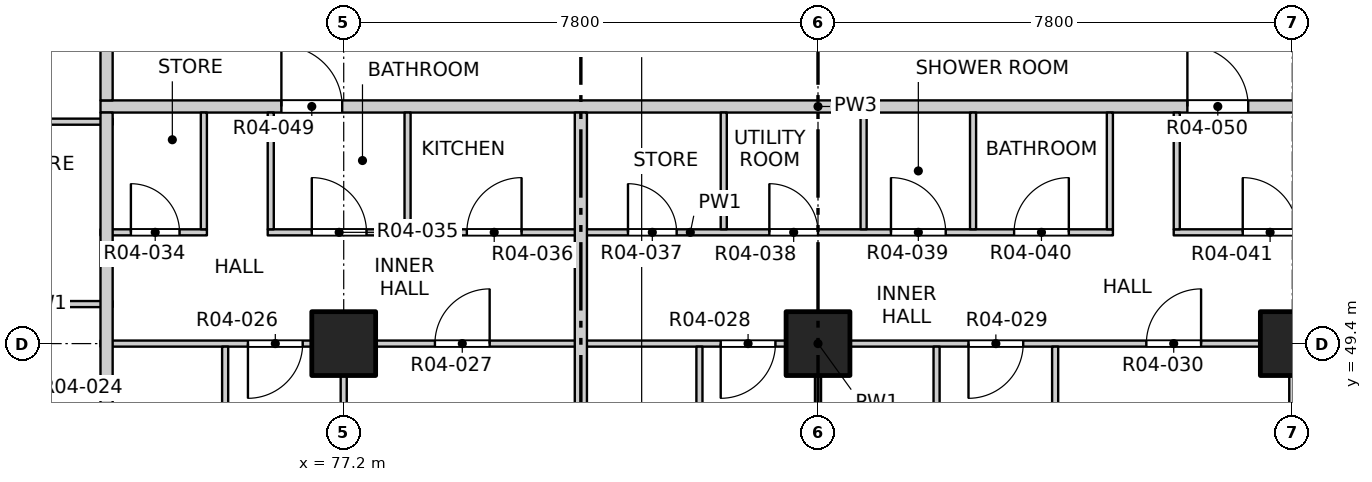
"""IFC4 building model, lengths in metres.
Left out: names, types, materials, properties, quantities, classifications, styles, units other than length and angle.
Written with IfcOpenShell. Run it as: python <this file> out.ifc"""

import sys

from ifc_helpers import new_model, si_unit, direction, frame, frame_2d, origin, origin_2d, place, context, subcontext, project, spatial, rectangle, extrude, element, fill, save


model = new_model("IFC4")
c1 = context("Model", 3, precision=1e-05, world=origin(), true_north=direction((0.0, 1.0)))
c2 = subcontext(c1, "Body", "Model", "MODEL_VIEW")
j1 = project(units=[si_unit("LENGTHUNIT", "METRE"), si_unit("PLANEANGLEUNIT", "RADIAN")], contexts=[c1])
p1 = place(None, origin())
s1 = spatial("IfcSite", under=j1, at=p1, CompositionType="ELEMENT")
p2 = place(p1, origin())
s2 = spatial("IfcBuilding", under=s1, at=p2, CompositionType="ELEMENT")
p3 = place(p2, frame((0.0, 0.0, 58.0)))
s3 = spatial("IfcBuildingStorey", under=s2, at=p3, CompositionType="ELEMENT", Elevation=58.0)
for number, where, z_axis, x_axis in (
    (1, (77.2, 49.4, -0.25), (0.0, 0.0, 1.0), (1.0, 0.0, 0.0)),
    (2, (85.0, 49.4, -0.25), (0.0, 0.0, 1.0), (1.0, 0.0, 0.0)),
    (3, (92.8, 49.4, -0.25), (0.0, 0.0, 1.0), (1.0, 0.0, 0.0)),
):
    element("IfcColumn", number, at=place(p3, frame(where, z_axis=z_axis, x_axis=x_axis)), inside=s3, PredefinedType="COLUMN", context=c2, shape_type="SweptSolid", body=[
        extrude(rectangle(XDim=1.05, YDim=1.05, at=origin_2d()), origin(), (0.0, 0.0, 1.0), 3.4),
    ])
p4 = place(p3, frame((73.2, 49.4, 0.0), z_axis=(0.0, 0.0, 1.0), x_axis=(1.0, 0.0, 0.0)))
e4 = element("IfcWall", 4, at=p4, inside=s3, PredefinedType="PARTITIONING", context=c2, shape_type="SweptSolid", body=[
    extrude(rectangle(XDim=23.6, YDim=0.1, at=frame_2d((11.8, 0.0))), origin(), (0.0, 0.0, 1.0), 3.15),
])
p5 = place(p4, frame((2.425, 0.0, 0.0)))
e5 = element("IfcOpeningElement", 5, at=p5, cuts=e4, PredefinedType="OPENING", context=c2, shape_type="SweptSolid", body=[
    extrude(rectangle(XDim=0.9, YDim=2.1, at=frame_2d((0.45, 1.05))), frame((0.0, 0.06, 0.0), z_axis=(0.0, -1.0, 0.0), x_axis=(1.0, 0.0, 0.0)), (0.0, 0.0, 1.0), 0.12),
])
p6 = place(p4, frame((5.5, 0.0, 0.0)))
e6 = element("IfcOpeningElement", 6, at=p6, cuts=e4, PredefinedType="OPENING", context=c2, shape_type="SweptSolid", body=[
    extrude(rectangle(XDim=0.9, YDim=2.1, at=frame_2d((0.45, 1.05))), frame((0.0, 0.06, 0.0), z_axis=(0.0, -1.0, 0.0), x_axis=(1.0, 0.0, 0.0)), (0.0, 0.0, 1.0), 0.12),
])
p7 = place(p4, frame((10.2, 0.0, 0.0)))
e7 = element("IfcOpeningElement", 7, at=p7, cuts=e4, PredefinedType="OPENING", context=c2, shape_type="SweptSolid", body=[
    extrude(rectangle(XDim=0.9, YDim=2.1, at=frame_2d((0.45, 1.05))), frame((0.0, 0.06, 0.0), z_axis=(0.0, -1.0, 0.0), x_axis=(1.0, 0.0, 0.0)), (0.0, 0.0, 1.0), 0.12),
])
p8 = place(p4, frame((14.275, 0.0, 0.0)))
e8 = element("IfcOpeningElement", 8, at=p8, cuts=e4, PredefinedType="OPENING", context=c2, shape_type="SweptSolid", body=[
    extrude(rectangle(XDim=0.9, YDim=2.1, at=frame_2d((0.45, 1.05))), frame((0.0, 0.06, 0.0), z_axis=(0.0, -1.0, 0.0), x_axis=(1.0, 0.0, 0.0)), (0.0, 0.0, 1.0), 0.12),
])
p9 = place(p4, frame((17.2, 0.0, 0.0)))
e9 = element("IfcOpeningElement", 9, at=p9, cuts=e4, PredefinedType="OPENING", context=c2, shape_type="SweptSolid", body=[
    extrude(rectangle(XDim=0.9, YDim=2.1, at=frame_2d((0.45, 1.05))), frame((0.0, 0.06, 0.0), z_axis=(0.0, -1.0, 0.0), x_axis=(1.0, 0.0, 0.0)), (0.0, 0.0, 1.0), 0.12),
])
p10 = place(p4, frame((21.1, 0.0, 0.0)))
e10 = element("IfcOpeningElement", 10, at=p10, cuts=e4, PredefinedType="OPENING", context=c2, shape_type="SweptSolid", body=[
    extrude(rectangle(XDim=0.9, YDim=2.1, at=frame_2d((0.45, 1.05))), frame((0.0, 0.06, 0.0), z_axis=(0.0, -1.0, 0.0), x_axis=(1.0, 0.0, 0.0)), (0.0, 0.0, 1.0), 0.12),
])
p11 = place(p3, frame((71.18, 50.05, 0.0), z_axis=(0.0, 0.0, 1.0), x_axis=(1.0, 0.0, 0.0)))
e11 = element("IfcWall", 11, at=p11, inside=s3, PredefinedType="PARTITIONING", context=c2, shape_type="SweptSolid", body=[
    extrude(rectangle(XDim=2.22, YDim=0.1, at=frame_2d((1.11, 0.0))), origin(), (0.0, 0.0, 1.0), 3.15),
])
p12 = place(p3, frame((73.2, 51.23, 0.0), z_axis=(0.0, 0.0, 1.0), x_axis=(1.0, 0.0, 0.0)))
e12 = element("IfcWall", 12, at=p12, inside=s3, PredefinedType="PARTITIONING", context=c2, shape_type="SweptSolid", body=[
    extrude(rectangle(XDim=1.75, YDim=0.1, at=frame_2d((0.875, 0.0))), origin(), (0.0, 0.0, 1.0), 3.15),
])
p13 = place(p12, frame((0.5, 0.0, 0.0)))
e13 = element("IfcOpeningElement", 13, at=p13, cuts=e12, PredefinedType="OPENING", context=c2, shape_type="SweptSolid", body=[
    extrude(rectangle(XDim=0.8, YDim=2.1, at=frame_2d((0.4, 1.05))), frame((0.0, 0.06, 0.0), z_axis=(0.0, -1.0, 0.0), x_axis=(1.0, 0.0, 0.0)), (0.0, 0.0, 1.0), 0.12),
])
p14 = place(p3, frame((75.95, 51.23, 0.0), z_axis=(0.0, 0.0, 1.0), x_axis=(1.0, 0.0, 0.0)))
e14 = element("IfcWall", 14, at=p14, inside=s3, PredefinedType="PARTITIONING", context=c2, shape_type="SweptSolid", body=[
    extrude(rectangle(XDim=13.9, YDim=0.1, at=frame_2d((6.95, 0.0))), origin(), (0.0, 0.0, 1.0), 3.15),
])
p15 = place(p14, frame((0.725, 0.0, 0.0)))
e15 = element("IfcOpeningElement", 15, at=p15, cuts=e14, PredefinedType="OPENING", context=c2, shape_type="SweptSolid", body=[
    extrude(rectangle(XDim=0.9, YDim=2.1, at=frame_2d((0.45, 1.05))), frame((0.0, 0.06, 0.0), z_axis=(0.0, -1.0, 0.0), x_axis=(1.0, 0.0, 0.0)), (0.0, 0.0, 1.0), 0.12),
])
p16 = place(p14, frame((3.275, 0.0, 0.0)))
e16 = element("IfcOpeningElement", 16, at=p16, cuts=e14, PredefinedType="OPENING", context=c2, shape_type="SweptSolid", body=[
    extrude(rectangle(XDim=0.9, YDim=2.1, at=frame_2d((0.45, 1.05))), frame((0.0, 0.06, 0.0), z_axis=(0.0, -1.0, 0.0), x_axis=(1.0, 0.0, 0.0)), (0.0, 0.0, 1.0), 0.12),
])
p17 = place(p14, frame((5.925, 0.0, 0.0)))
e17 = element("IfcOpeningElement", 17, at=p17, cuts=e14, PredefinedType="OPENING", context=c2, shape_type="SweptSolid", body=[
    extrude(rectangle(XDim=0.8, YDim=2.1, at=frame_2d((0.4, 1.05))), frame((0.0, 0.06, 0.0), z_axis=(0.0, -1.0, 0.0), x_axis=(1.0, 0.0, 0.0)), (0.0, 0.0, 1.0), 0.12),
])
p18 = place(p14, frame((8.25, 0.0, 0.0)))
e18 = element("IfcOpeningElement", 18, at=p18, cuts=e14, PredefinedType="OPENING", context=c2, shape_type="SweptSolid", body=[
    extrude(rectangle(XDim=0.8, YDim=2.1, at=frame_2d((0.4, 1.05))), frame((0.0, 0.06, 0.0), z_axis=(0.0, -1.0, 0.0), x_axis=(1.0, 0.0, 0.0)), (0.0, 0.0, 1.0), 0.12),
])
p19 = place(p14, frame((10.25, 0.0, 0.0)))
e19 = element("IfcOpeningElement", 19, at=p19, cuts=e14, PredefinedType="OPENING", context=c2, shape_type="SweptSolid", body=[
    extrude(rectangle(XDim=0.9, YDim=2.1, at=frame_2d((0.45, 1.05))), frame((0.0, 0.06, 0.0), z_axis=(0.0, -1.0, 0.0), x_axis=(1.0, 0.0, 0.0)), (0.0, 0.0, 1.0), 0.12),
])
p20 = place(p14, frame((12.275, 0.0, 0.0)))
e20 = element("IfcOpeningElement", 20, at=p20, cuts=e14, PredefinedType="OPENING", context=c2, shape_type="SweptSolid", body=[
    extrude(rectangle(XDim=0.9, YDim=2.1, at=frame_2d((0.45, 1.05))), frame((0.0, 0.06, 0.0), z_axis=(0.0, -1.0, 0.0), x_axis=(1.0, 0.0, 0.0)), (0.0, 0.0, 1.0), 0.12),
])
p21 = place(p3, frame((90.85, 51.23, 0.0), z_axis=(0.0, 0.0, 1.0), x_axis=(1.0, 0.0, 0.0)))
e21 = element("IfcWall", 21, at=p21, inside=s3, PredefinedType="PARTITIONING", context=c2, shape_type="SweptSolid", body=[
    extrude(rectangle(XDim=5.95, YDim=0.1, at=frame_2d((2.975, 0.0))), origin(), (0.0, 0.0, 1.0), 3.15),
])
p22 = place(p21, frame((1.135, 0.0, 0.0)))
e22 = element("IfcOpeningElement", 22, at=p22, cuts=e21, PredefinedType="OPENING", context=c2, shape_type="SweptSolid", body=[
    extrude(rectangle(XDim=0.9, YDim=2.1, at=frame_2d((0.45, 1.05))), frame((0.0, 0.06, 0.0), z_axis=(0.0, -1.0, 0.0), x_axis=(1.0, 0.0, 0.0)), (0.0, 0.0, 1.0), 0.12),
])
p23 = place(p21, frame((4.085, 0.0, 0.0)))
e23 = element("IfcOpeningElement", 23, at=p23, cuts=e21, PredefinedType="OPENING", context=c2, shape_type="SweptSolid", body=[
    extrude(rectangle(XDim=0.8, YDim=2.1, at=frame_2d((0.4, 1.05))), frame((0.0, 0.06, 0.0), z_axis=(0.0, -1.0, 0.0), x_axis=(1.0, 0.0, 0.0)), (0.0, 0.0, 1.0), 0.12),
])
p24 = place(p3, frame((71.18, 53.05, 0.0), z_axis=(0.0, 0.0, 1.0), x_axis=(1.0, 0.0, 0.0)))
e24 = element("IfcWall", 24, at=p24, inside=s3, PredefinedType="PARTITIONING", context=c2, shape_type="SweptSolid", body=[
    extrude(rectangle(XDim=2.22, YDim=0.1, at=frame_2d((1.11, 0.0))), origin(), (0.0, 0.0, 1.0), 3.15),
])
p25 = place(p3, frame((73.2, 53.3, 0.0), z_axis=(0.0, 0.0, 1.0), x_axis=(1.0, 0.0, 0.0)))
e25 = element("IfcWall", 25, at=p25, inside=s3, PredefinedType="PARTITIONING", context=c2, shape_type="SweptSolid", body=[
    extrude(rectangle(XDim=23.6, YDim=0.2, at=frame_2d((11.8, 0.0))), origin(), (0.0, 0.0, 1.0), 3.15),
])
p26 = place(p25, frame((2.975, 0.0, 0.0)))
e26 = element("IfcOpeningElement", 26, at=p26, cuts=e25, PredefinedType="OPENING", context=c2, shape_type="SweptSolid", body=[
    extrude(rectangle(XDim=1.0, YDim=2.1, at=frame_2d((0.5, 1.05))), frame((0.0, 0.11, 0.0), z_axis=(0.0, -1.0, 0.0), x_axis=(1.0, 0.0, 0.0)), (0.0, 0.0, 1.0), 0.22),
])
p27 = place(p25, frame((17.875, 0.0, 0.0)))
e27 = element("IfcOpeningElement", 27, at=p27, cuts=e25, PredefinedType="OPENING", context=c2, shape_type="SweptSolid", body=[
    extrude(rectangle(XDim=1.0, YDim=2.1, at=frame_2d((0.5, 1.05))), frame((0.0, 0.11, 0.0), z_axis=(0.0, -1.0, 0.0), x_axis=(1.0, 0.0, 0.0)), (0.0, 0.0, 1.0), 0.22),
])
p28 = place(p3, frame((73.3, 41.9, 0.0), z_axis=(0.0, 0.0, 1.0), x_axis=(0.0, 1.0, 0.0)))
e28 = element("IfcWall", 28, at=p28, inside=s3, PredefinedType="PARTITIONING", context=c2, shape_type="SweptSolid", body=[
    extrude(rectangle(XDim=11.3, YDim=0.2, at=frame_2d((5.65, 0.0))), origin(), (0.0, 0.0, 1.0), 3.15),
])
p29 = place(p3, frame((73.3, 53.4, 0.0), z_axis=(0.0, 0.0, 1.0), x_axis=(0.0, 1.0, 0.0)))
e29 = element("IfcWall", 29, at=p29, inside=s3, PredefinedType="PARTITIONING", context=c2, shape_type="SweptSolid", body=[
    extrude(rectangle(XDim=31.0, YDim=0.2, at=frame_2d((15.5, 0.0))), origin(), (0.0, 0.0, 1.0), 3.15),
])
p30 = place(p29, frame((3.325, 0.0, 0.0)))
e30 = element("IfcOpeningElement", 30, at=p30, cuts=e29, PredefinedType="OPENING", context=c2, shape_type="SweptSolid", body=[
    extrude(rectangle(XDim=1.0, YDim=2.1, at=frame_2d((0.5, 1.05))), frame((0.0, 0.11, 0.0), z_axis=(0.0, -1.0, 0.0), x_axis=(1.0, 0.0, 0.0)), (0.0, 0.0, 1.0), 0.22),
])
p31 = place(p29, frame((21.675, 0.0, 0.0)))
e31 = element("IfcOpeningElement", 31, at=p31, cuts=e29, PredefinedType="OPENING", context=c2, shape_type="SweptSolid", body=[
    extrude(rectangle(XDim=1.0, YDim=2.1, at=frame_2d((0.5, 1.05))), frame((0.0, 0.11, 0.0), z_axis=(0.0, -1.0, 0.0), x_axis=(1.0, 0.0, 0.0)), (0.0, 0.0, 1.0), 0.22),
])
p32 = place(p29, frame((26.225, 0.0, 0.0)))
e32 = element("IfcOpeningElement", 32, at=p32, cuts=e29, PredefinedType="OPENING", context=c2, shape_type="SweptSolid", body=[
    extrude(rectangle(XDim=1.0, YDim=2.1, at=frame_2d((0.5, 1.05))), frame((0.0, 0.11, 0.0), z_axis=(0.0, -1.0, 0.0), x_axis=(1.0, 0.0, 0.0)), (0.0, 0.0, 1.0), 0.22),
])
p33 = place(p3, frame((74.9, 51.28, 0.0), z_axis=(0.0, 0.0, 1.0), x_axis=(0.0, 1.0, 0.0)))
e33 = element("IfcWall", 33, at=p33, inside=s3, PredefinedType="PARTITIONING", context=c2, shape_type="SweptSolid", body=[
    extrude(rectangle(XDim=1.92, YDim=0.1, at=frame_2d((0.96, 0.0))), origin(), (0.0, 0.0, 1.0), 3.15),
])
p34 = place(p3, frame((75.25, 45.85, 0.0), z_axis=(0.0, 0.0, 1.0), x_axis=(0.0, 1.0, 0.0)))
e34 = element("IfcWall", 34, at=p34, inside=s3, PredefinedType="PARTITIONING", context=c2, shape_type="SweptSolid", body=[
    extrude(rectangle(XDim=3.5, YDim=0.1, at=frame_2d((1.75, 0.0))), origin(), (0.0, 0.0, 1.0), 3.15),
])
p35 = place(p3, frame((76.0, 51.28, 0.0), z_axis=(0.0, 0.0, 1.0), x_axis=(0.0, 1.0, 0.0)))
e35 = element("IfcWall", 35, at=p35, inside=s3, PredefinedType="PARTITIONING", context=c2, shape_type="SweptSolid", body=[
    extrude(rectangle(XDim=1.92, YDim=0.1, at=frame_2d((0.96, 0.0))), origin(), (0.0, 0.0, 1.0), 3.15),
])
p36 = place(p3, frame((77.2, 41.9, 0.0), z_axis=(0.0, 0.0, 1.0), x_axis=(0.0, 1.0, 0.0)))
e36 = element("IfcWall", 36, at=p36, inside=s3, PredefinedType="PARTITIONING", context=c2, shape_type="SweptSolid", body=[
    extrude(rectangle(XDim=7.45, YDim=0.1, at=frame_2d((3.725, 0.0))), origin(), (0.0, 0.0, 1.0), 2.55),
])
p37 = place(p3, frame((78.25, 51.28, 0.0), z_axis=(0.0, 0.0, 1.0), x_axis=(0.0, 1.0, 0.0)))
e37 = element("IfcWall", 37, at=p37, inside=s3, PredefinedType="PARTITIONING", context=c2, shape_type="SweptSolid", body=[
    extrude(rectangle(XDim=1.92, YDim=0.1, at=frame_2d((0.96, 0.0))), origin(), (0.0, 0.0, 1.0), 3.15),
])
p38 = place(p3, frame((81.1, 41.9, 0.0), z_axis=(0.0, 0.0, 1.0), x_axis=(0.0, 1.0, 0.0)))
e38 = element("IfcWall", 38, at=p38, inside=s3, PredefinedType="PARTITIONING", context=c2, shape_type="SweptSolid", body=[
    extrude(rectangle(XDim=11.3, YDim=0.2, at=frame_2d((5.65, 0.0))), origin(), (0.0, 0.0, 1.0), 3.15),
])
p39 = place(p3, frame((83.05, 46.15, 0.0), z_axis=(0.0, 0.0, 1.0), x_axis=(0.0, 1.0, 0.0)))
e39 = element("IfcWall", 39, at=p39, inside=s3, PredefinedType="PARTITIONING", context=c2, shape_type="SweptSolid", body=[
    extrude(rectangle(XDim=3.2, YDim=0.1, at=frame_2d((1.6, 0.0))), origin(), (0.0, 0.0, 1.0), 3.15),
])
p40 = place(p3, frame((83.45, 51.28, 0.0), z_axis=(0.0, 0.0, 1.0), x_axis=(0.0, 1.0, 0.0)))
e40 = element("IfcWall", 40, at=p40, inside=s3, PredefinedType="PARTITIONING", context=c2, shape_type="SweptSolid", body=[
    extrude(rectangle(XDim=1.92, YDim=0.1, at=frame_2d((0.96, 0.0))), origin(), (0.0, 0.0, 1.0), 3.15),
])
p41 = place(p3, frame((85.0, 41.9, 0.0), z_axis=(0.0, 0.0, 1.0), x_axis=(0.0, 1.0, 0.0)))
e41 = element("IfcWall", 41, at=p41, inside=s3, PredefinedType="PARTITIONING", context=c2, shape_type="SweptSolid", body=[
    extrude(rectangle(XDim=7.45, YDim=0.1, at=frame_2d((3.725, 0.0))), origin(), (0.0, 0.0, 1.0), 2.55),
])
p42 = place(p3, frame((85.75, 51.28, 0.0), z_axis=(0.0, 0.0, 1.0), x_axis=(0.0, 1.0, 0.0)))
e42 = element("IfcWall", 42, at=p42, inside=s3, PredefinedType="PARTITIONING", context=c2, shape_type="SweptSolid", body=[
    extrude(rectangle(XDim=1.92, YDim=0.1, at=frame_2d((0.96, 0.0))), origin(), (0.0, 0.0, 1.0), 3.15),
])
p43 = place(p3, frame((86.95, 46.15, 0.0), z_axis=(0.0, 0.0, 1.0), x_axis=(0.0, 1.0, 0.0)))
e43 = element("IfcWall", 43, at=p43, inside=s3, PredefinedType="PARTITIONING", context=c2, shape_type="SweptSolid", body=[
    extrude(rectangle(XDim=3.2, YDim=0.1, at=frame_2d((1.6, 0.0))), origin(), (0.0, 0.0, 1.0), 3.15),
])
p44 = place(p3, frame((87.55, 51.28, 0.0), z_axis=(0.0, 0.0, 1.0), x_axis=(0.0, 1.0, 0.0)))
e44 = element("IfcWall", 44, at=p44, inside=s3, PredefinedType="PARTITIONING", context=c2, shape_type="SweptSolid", body=[
    extrude(rectangle(XDim=1.92, YDim=0.1, at=frame_2d((0.96, 0.0))), origin(), (0.0, 0.0, 1.0), 3.15),
])
p45 = place(p3, frame((88.9, 41.9, 0.0), z_axis=(0.0, 0.0, 1.0), x_axis=(0.0, 1.0, 0.0)))
e45 = element("IfcWall", 45, at=p45, inside=s3, PredefinedType="PARTITIONING", context=c2, shape_type="SweptSolid", body=[
    extrude(rectangle(XDim=7.45, YDim=0.1, at=frame_2d((3.725, 0.0))), origin(), (0.0, 0.0, 1.0), 3.15),
])
for number, where, z_axis, x_axis in (
    (46, (89.8, 51.28, 0.0), (0.0, 0.0, 1.0), (0.0, 1.0, 0.0)),
    (47, (90.9, 51.28, 0.0), (0.0, 0.0, 1.0), (0.0, 1.0, 0.0)),
):
    element("IfcWall", number, at=place(p3, frame(where, z_axis=z_axis, x_axis=x_axis)), inside=s3, PredefinedType="PARTITIONING", context=c2, shape_type="SweptSolid", body=[
        extrude(rectangle(XDim=1.92, YDim=0.1, at=frame_2d((0.96, 0.0))), origin(), (0.0, 0.0, 1.0), 3.15),
    ])
p46 = place(p3, frame((92.8, 41.9, 0.0), z_axis=(0.0, 0.0, 1.0), x_axis=(0.0, 1.0, 0.0)))
e48 = element("IfcWall", 48, at=p46, inside=s3, PredefinedType="PARTITIONING", context=c2, shape_type="SweptSolid", body=[
    extrude(rectangle(XDim=7.45, YDim=0.1, at=frame_2d((3.725, 0.0))), origin(), (0.0, 0.0, 1.0), 2.55),
])
p47 = place(p5, origin())
e49 = element("IfcDoor", 49, at=p47, inside=s3, OperationType="SINGLE_SWING_RIGHT", PredefinedType="DOOR", context=c2, shape_type="SweptSolid", body=[
    extrude(rectangle(XDim=0.9, YDim=2.1, at=frame_2d((0.45, 1.05))), frame((0.0, 0.025, 0.0), z_axis=(0.0, -1.0, 0.0), x_axis=(1.0, 0.0, 0.0)), (0.0, 0.0, 1.0), 0.05),
])
fill(e5, e49)
p48 = place(p6, origin())
e50 = element("IfcDoor", 50, at=p48, inside=s3, OperationType="SINGLE_SWING_RIGHT", PredefinedType="DOOR", context=c2, shape_type="SweptSolid", body=[
    extrude(rectangle(XDim=0.9, YDim=2.1, at=frame_2d((0.45, 1.05))), frame((0.0, 0.025, 0.0), z_axis=(0.0, -1.0, 0.0), x_axis=(1.0, 0.0, 0.0)), (0.0, 0.0, 1.0), 0.05),
])
fill(e6, e50)
p49 = place(p7, origin())
e51 = element("IfcDoor", 51, at=p49, inside=s3, OperationType="SINGLE_SWING_RIGHT", PredefinedType="DOOR", context=c2, shape_type="SweptSolid", body=[
    extrude(rectangle(XDim=0.9, YDim=2.1, at=frame_2d((0.45, 1.05))), frame((0.0, 0.025, 0.0), z_axis=(0.0, -1.0, 0.0), x_axis=(1.0, 0.0, 0.0)), (0.0, 0.0, 1.0), 0.05),
])
fill(e7, e51)
p50 = place(p8, origin())
e52 = element("IfcDoor", 52, at=p50, inside=s3, OperationType="SINGLE_SWING_RIGHT", PredefinedType="DOOR", context=c2, shape_type="SweptSolid", body=[
    extrude(rectangle(XDim=0.9, YDim=2.1, at=frame_2d((0.45, 1.05))), frame((0.0, 0.025, 0.0), z_axis=(0.0, -1.0, 0.0), x_axis=(1.0, 0.0, 0.0)), (0.0, 0.0, 1.0), 0.05),
])
fill(e8, e52)
p51 = place(p9, origin())
e53 = element("IfcDoor", 53, at=p51, inside=s3, OperationType="SINGLE_SWING_RIGHT", PredefinedType="DOOR", context=c2, shape_type="SweptSolid", body=[
    extrude(rectangle(XDim=0.9, YDim=2.1, at=frame_2d((0.45, 1.05))), frame((0.0, 0.025, 0.0), z_axis=(0.0, -1.0, 0.0), x_axis=(1.0, 0.0, 0.0)), (0.0, 0.0, 1.0), 0.05),
])
fill(e9, e53)
p52 = place(p13, origin())
e54 = element("IfcDoor", 54, at=p52, inside=s3, OperationType="SINGLE_SWING_LEFT", PredefinedType="DOOR", context=c2, shape_type="SweptSolid", body=[
    extrude(rectangle(XDim=0.8, YDim=2.1, at=frame_2d((0.4, 1.05))), frame((0.0, 0.025, 0.0), z_axis=(0.0, -1.0, 0.0), x_axis=(1.0, 0.0, 0.0)), (0.0, 0.0, 1.0), 0.05),
])
fill(e13, e54)
p53 = place(p15, origin())
e55 = element("IfcDoor", 55, at=p53, inside=s3, OperationType="SINGLE_SWING_LEFT", PredefinedType="DOOR", context=c2, shape_type="SweptSolid", body=[
    extrude(rectangle(XDim=0.9, YDim=2.1, at=frame_2d((0.45, 1.05))), frame((0.0, 0.025, 0.0), z_axis=(0.0, -1.0, 0.0), x_axis=(1.0, 0.0, 0.0)), (0.0, 0.0, 1.0), 0.05),
])
fill(e15, e55)
p54 = place(p16, origin())
e56 = element("IfcDoor", 56, at=p54, inside=s3, OperationType="SINGLE_SWING_RIGHT", PredefinedType="DOOR", context=c2, shape_type="SweptSolid", body=[
    extrude(rectangle(XDim=0.9, YDim=2.1, at=frame_2d((0.45, 1.05))), frame((0.0, 0.025, 0.0), z_axis=(0.0, -1.0, 0.0), x_axis=(1.0, 0.0, 0.0)), (0.0, 0.0, 1.0), 0.05),
])
fill(e16, e56)
p55 = place(p17, origin())
e57 = element("IfcDoor", 57, at=p55, inside=s3, OperationType="SINGLE_SWING_LEFT", PredefinedType="DOOR", context=c2, shape_type="SweptSolid", body=[
    extrude(rectangle(XDim=0.8, YDim=2.1, at=frame_2d((0.4, 1.05))), frame((0.0, 0.025, 0.0), z_axis=(0.0, -1.0, 0.0), x_axis=(1.0, 0.0, 0.0)), (0.0, 0.0, 1.0), 0.05),
])
fill(e17, e57)
p56 = place(p18, origin())
e58 = element("IfcDoor", 58, at=p56, inside=s3, OperationType="SINGLE_SWING_LEFT", PredefinedType="DOOR", context=c2, shape_type="SweptSolid", body=[
    extrude(rectangle(XDim=0.8, YDim=2.1, at=frame_2d((0.4, 1.05))), frame((0.0, 0.025, 0.0), z_axis=(0.0, -1.0, 0.0), x_axis=(1.0, 0.0, 0.0)), (0.0, 0.0, 1.0), 0.05),
])
fill(e18, e58)
p57 = place(p19, origin())
e59 = element("IfcDoor", 59, at=p57, inside=s3, OperationType="SINGLE_SWING_LEFT", PredefinedType="DOOR", context=c2, shape_type="SweptSolid", body=[
    extrude(rectangle(XDim=0.9, YDim=2.1, at=frame_2d((0.45, 1.05))), frame((0.0, 0.025, 0.0), z_axis=(0.0, -1.0, 0.0), x_axis=(1.0, 0.0, 0.0)), (0.0, 0.0, 1.0), 0.05),
])
fill(e19, e59)
p58 = place(p20, origin())
e60 = element("IfcDoor", 60, at=p58, inside=s3, OperationType="SINGLE_SWING_RIGHT", PredefinedType="DOOR", context=c2, shape_type="SweptSolid", body=[
    extrude(rectangle(XDim=0.9, YDim=2.1, at=frame_2d((0.45, 1.05))), frame((0.0, 0.025, 0.0), z_axis=(0.0, -1.0, 0.0), x_axis=(1.0, 0.0, 0.0)), (0.0, 0.0, 1.0), 0.05),
])
fill(e20, e60)
p59 = place(p22, origin())
e61 = element("IfcDoor", 61, at=p59, inside=s3, OperationType="SINGLE_SWING_LEFT", PredefinedType="DOOR", context=c2, shape_type="SweptSolid", body=[
    extrude(rectangle(XDim=0.9, YDim=2.1, at=frame_2d((0.45, 1.05))), frame((0.0, 0.025, 0.0), z_axis=(0.0, -1.0, 0.0), x_axis=(1.0, 0.0, 0.0)), (0.0, 0.0, 1.0), 0.05),
])
fill(e22, e61)
p60 = place(p26, origin())
e62 = element("IfcDoor", 62, at=p60, inside=s3, OperationType="SINGLE_SWING_LEFT", PredefinedType="DOOR", context=c2, shape_type="SweptSolid", body=[
    extrude(rectangle(XDim=1.0, YDim=2.1, at=frame_2d((0.5, 1.05))), frame((0.0, 0.025, 0.0), z_axis=(0.0, -1.0, 0.0), x_axis=(1.0, 0.0, 0.0)), (0.0, 0.0, 1.0), 0.05),
])
fill(e26, e62)
p61 = place(p27, origin())
e63 = element("IfcDoor", 63, at=p61, inside=s3, OperationType="SINGLE_SWING_LEFT", PredefinedType="DOOR", context=c2, shape_type="SweptSolid", body=[
    extrude(rectangle(XDim=1.0, YDim=2.1, at=frame_2d((0.5, 1.05))), frame((0.0, 0.025, 0.0), z_axis=(0.0, -1.0, 0.0), x_axis=(1.0, 0.0, 0.0)), (0.0, 0.0, 1.0), 0.05),
])
fill(e27, e63)
save(model, sys.argv[1])
